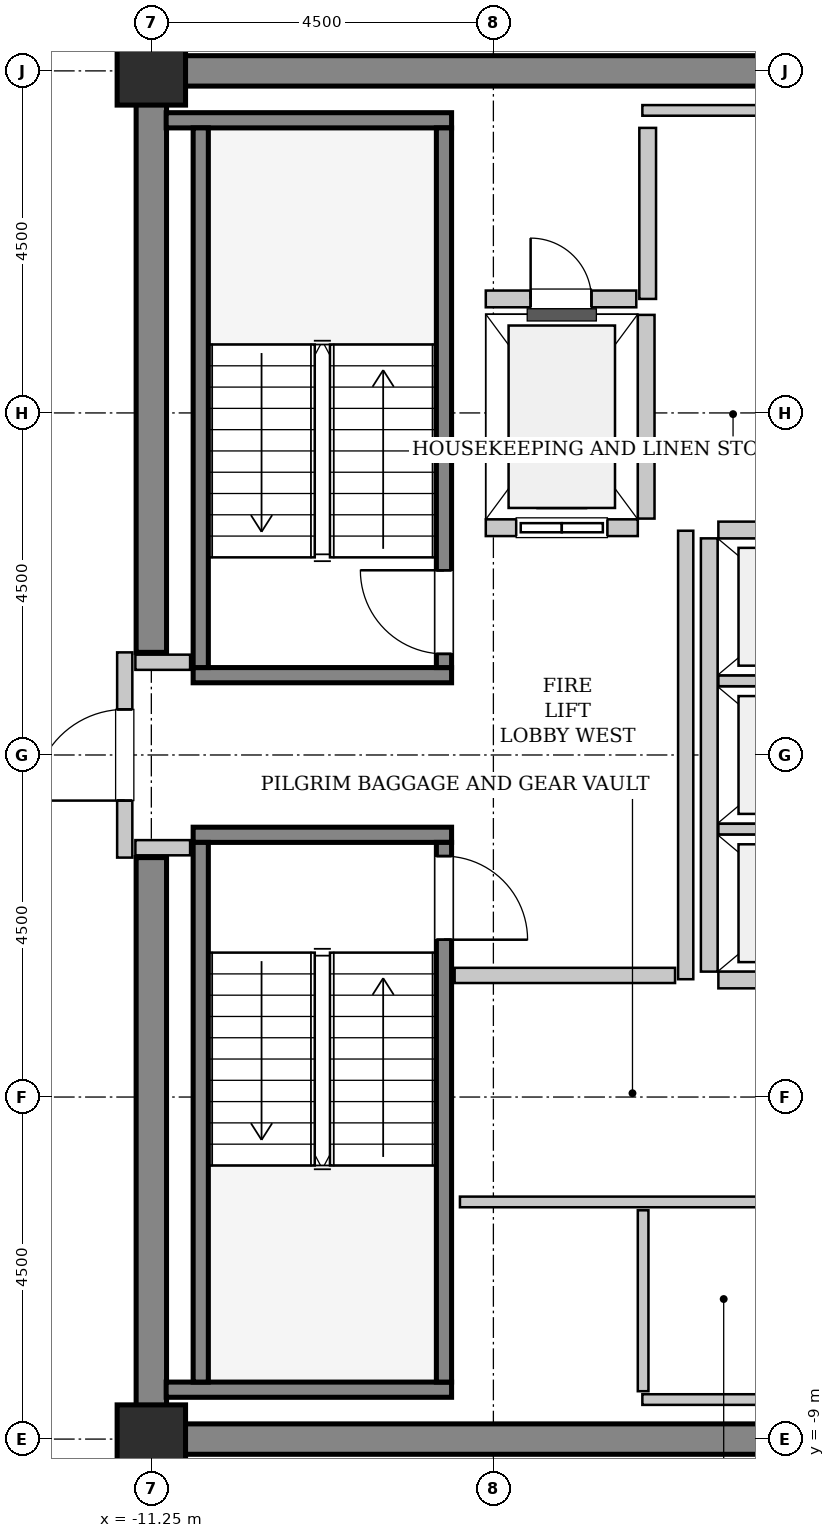
"""IFC4 building model, lengths in metres.
Left out: names, types, materials, properties, quantities, classifications, styles, units other than length and angle.
Written with IfcOpenShell. Run it as: python <this file> out.ifc"""

import sys

from ifc_helpers import new_model, si_unit, direction, frame, frame_2d, origin, origin_2d, place, context, subcontext, project, spatial, rectangle, extrude, source, transform, mapped, element, fill, save


model = new_model("IFC4")
c1 = context("Model", 3, precision=1e-05, world=origin(), true_north=direction((0.0, 1.0)))
c2 = subcontext(c1, "Body", "Model", "MODEL_VIEW")
j1 = project(units=[si_unit("LENGTHUNIT", "METRE"), si_unit("PLANEANGLEUNIT", "RADIAN")], contexts=[c1])
p1 = place(None, origin())
s1 = spatial("IfcSite", under=j1, at=p1, CompositionType="ELEMENT")
p2 = place(p1, origin())
s2 = spatial("IfcBuilding", under=s1, at=p2, CompositionType="ELEMENT")
p3 = place(p2, frame((0.0, 0.0, 326.2)))
s3 = spatial("IfcBuildingStorey", under=s2, at=p3, CompositionType="ELEMENT", Elevation=326.2)
m1 = source(origin(), c2, "Body", "SweptSolid", [
    extrude(rectangle(XDim=9.9, YDim=0.4, at=frame_2d((4.95, 0.0))), origin(), (0.0, 0.0, 1.0), 3.8),
])
for number, where, z_axis, x_axis in (
    (1, (-11.45, 9.0, 0.0), (0.0, 0.0, 1.0), (1.0, 0.0, 0.0)),
    (2, (-11.45, -9.0, 0.0), (0.0, 0.0, 1.0), (1.0, 0.0, 0.0)),
):
    element("IfcWall", number, at=place(p3, frame(where, z_axis=z_axis, x_axis=x_axis)), inside=s3, PredefinedType="SHEAR", context=c2, shape_type="MappedRepresentation", body=[
        mapped(m1, transform((0.0, 0.0, 0.0), x_axis=(1.0, 0.0, 0.0), y_axis=(0.0, 1.0, 0.0), z_axis=(0.0, 0.0, 1.0), scale=1.0)),
    ])
m2 = source(origin(), c2, "Body", "SweptSolid", [
    extrude(rectangle(XDim=7.45, YDim=0.4, at=frame_2d((3.725, 0.0))), origin(), (0.0, 0.0, 1.0), 3.8),
])
for number, where, z_axis, x_axis in (
    (3, (-11.25, -8.8, 0.0), (0.0, 0.0, 1.0), (0.0, 1.0, 0.0)),
    (4, (-11.25, 1.35, 0.0), (0.0, 0.0, 1.0), (0.0, 1.0, 0.0)),
):
    element("IfcWall", number, at=place(p3, frame(where, z_axis=z_axis, x_axis=x_axis)), inside=s3, PredefinedType="SHEAR", context=c2, shape_type="MappedRepresentation", body=[
        mapped(m2, transform((0.0, 0.0, 0.0), x_axis=(1.0, 0.0, 0.0), y_axis=(0.0, 1.0, 0.0), z_axis=(0.0, 0.0, 1.0), scale=1.0)),
    ])
m3 = source(origin(), c2, "Body", "SweptSolid", [
    extrude(rectangle(XDim=0.9, YDim=0.9, at=origin_2d()), origin(), (0.0, 0.0, 1.0), 3.8),
])
for number, where, z_axis, x_axis in (
    (5, (-11.25, -9.0, 0.0), (0.0, 0.0, 1.0), (1.0, 0.0, 0.0)),
    (6, (-11.25, 9.0, 0.0), (0.0, 0.0, 1.0), (1.0, 0.0, 0.0)),
):
    element("IfcColumn", number, at=place(p3, frame(where, z_axis=z_axis, x_axis=x_axis)), inside=s3, PredefinedType="COLUMN", context=c2, shape_type="MappedRepresentation", body=[
        mapped(m3, transform((0.0, 0.0, 0.0), x_axis=(1.0, 0.0, 0.0), y_axis=(0.0, 1.0, 0.0), z_axis=(0.0, 0.0, 1.0), scale=1.0)),
    ])
m4 = source(origin(), c2, "Body", "SweptSolid", [
    extrude(rectangle(XDim=3.4, YDim=0.2, at=frame_2d((1.7, 0.0))), origin(), (0.0, 0.0, 1.0), 3.8),
])
p4 = place(p3, frame((-7.3, 1.05, 0.0), z_axis=(0.0, 0.0, 1.0), x_axis=(-1.0, 0.0, 0.0)))
e7 = element("IfcWall", 7, at=p4, inside=s3, PredefinedType="SOLIDWALL", context=c2, shape_type="MappedRepresentation", body=[
    mapped(m4, transform((0.0, 0.0, 0.0), x_axis=(1.0, 0.0, 0.0), y_axis=(0.0, 1.0, 0.0), z_axis=(0.0, 0.0, 1.0), scale=1.0)),
])
m5 = source(origin(), c2, "Body", "SweptSolid", [
    extrude(rectangle(XDim=3.755, YDim=0.2, at=frame_2d((1.877, 0.0))), origin(), (0.0, 0.0, 1.0), 3.8),
])
p5 = place(p3, frame((-7.3, 8.35, 0.0), z_axis=(0.0, 0.0, 1.0), x_axis=(-1.0, 0.0, 0.0)))
e8 = element("IfcWall", 8, at=p5, inside=s3, PredefinedType="SOLIDWALL", context=c2, shape_type="MappedRepresentation", body=[
    mapped(m5, transform((0.0, 0.0, 0.0), x_axis=(1.0, 0.0, 0.0), y_axis=(0.0, 1.0, 0.0), z_axis=(0.0, 0.0, 1.0), scale=1.0)),
])
m6 = source(origin(), c2, "Body", "SweptSolid", [
    extrude(rectangle(XDim=7.1, YDim=0.2, at=frame_2d((3.55, 0.0))), origin(), (0.0, 0.0, 1.0), 3.8),
])
p6 = place(p3, frame((-7.4, 1.15, 0.0), z_axis=(0.0, 0.0, 1.0), x_axis=(0.0, 1.0, 0.0)))
e9 = element("IfcWall", 9, at=p6, inside=s3, PredefinedType="SOLIDWALL", context=c2, shape_type="MappedRepresentation", body=[
    mapped(m6, transform((0.0, 0.0, 0.0), x_axis=(1.0, 0.0, 0.0), y_axis=(0.0, 1.0, 0.0), z_axis=(0.0, 0.0, 1.0), scale=1.0)),
])
p7 = place(p6, frame((0.18, 0.0, 0.0)))
e10 = element("IfcOpeningElement", 10, at=p7, cuts=e9, PredefinedType="OPENING", context=c2, shape_type="SweptSolid", body=[
    extrude(rectangle(XDim=1.1, YDim=2.15, at=frame_2d((0.55, 1.075))), frame((0.0, 0.11, 0.0), z_axis=(0.0, -1.0, 0.0), x_axis=(1.0, 0.0, 0.0)), (0.0, 0.0, 1.0), 0.22),
])
p8 = place(p3, frame((-10.6, 1.15, 0.0), z_axis=(0.0, 0.0, 1.0), x_axis=(0.0, 1.0, 0.0)))
e11 = element("IfcWall", 11, at=p8, inside=s3, PredefinedType="SOLIDWALL", context=c2, shape_type="MappedRepresentation", body=[
    mapped(m6, transform((0.0, 0.0, 0.0), x_axis=(1.0, 0.0, 0.0), y_axis=(0.0, 1.0, 0.0), z_axis=(0.0, 0.0, 1.0), scale=1.0)),
])
p9 = place(p3, frame((-10.7, -1.05, 0.0), z_axis=(0.0, 0.0, 1.0), x_axis=(1.0, 0.0, 0.0)))
e12 = element("IfcWall", 12, at=p9, inside=s3, PredefinedType="SOLIDWALL", context=c2, shape_type="MappedRepresentation", body=[
    mapped(m4, transform((0.0, 0.0, 0.0), x_axis=(1.0, 0.0, 0.0), y_axis=(0.0, 1.0, 0.0), z_axis=(0.0, 0.0, 1.0), scale=1.0)),
])
p10 = place(p3, frame((-11.055, -8.35, 0.0), z_axis=(0.0, 0.0, 1.0), x_axis=(1.0, 0.0, 0.0)))
e13 = element("IfcWall", 13, at=p10, inside=s3, PredefinedType="SOLIDWALL", context=c2, shape_type="MappedRepresentation", body=[
    mapped(m5, transform((0.0, 0.0, 0.0), x_axis=(1.0, 0.0, 0.0), y_axis=(0.0, 1.0, 0.0), z_axis=(0.0, 0.0, 1.0), scale=1.0)),
])
p11 = place(p3, frame((-10.6, -1.15, 0.0), z_axis=(0.0, 0.0, 1.0), x_axis=(0.0, -1.0, 0.0)))
e14 = element("IfcWall", 14, at=p11, inside=s3, PredefinedType="SOLIDWALL", context=c2, shape_type="MappedRepresentation", body=[
    mapped(m6, transform((0.0, 0.0, 0.0), x_axis=(1.0, 0.0, 0.0), y_axis=(0.0, 1.0, 0.0), z_axis=(0.0, 0.0, 1.0), scale=1.0)),
])
p12 = place(p3, frame((-7.4, -1.15, 0.0), z_axis=(0.0, 0.0, 1.0), x_axis=(0.0, -1.0, 0.0)))
e15 = element("IfcWall", 15, at=p12, inside=s3, PredefinedType="SOLIDWALL", context=c2, shape_type="MappedRepresentation", body=[
    mapped(m6, transform((0.0, 0.0, 0.0), x_axis=(1.0, 0.0, 0.0), y_axis=(0.0, 1.0, 0.0), z_axis=(0.0, 0.0, 1.0), scale=1.0)),
])
p13 = place(p12, frame((0.18, 0.0, 0.0)))
e16 = element("IfcOpeningElement", 16, at=p13, cuts=e15, PredefinedType="OPENING", context=c2, shape_type="SweptSolid", body=[
    extrude(rectangle(XDim=1.1, YDim=2.15, at=frame_2d((0.55, 1.075))), frame((0.0, 0.11, 0.0), z_axis=(0.0, -1.0, 0.0), x_axis=(1.0, 0.0, 0.0)), (0.0, 0.0, 1.0), 0.22),
])
m7 = source(origin(), c2, "Body", "SweptSolid", [
    extrude(rectangle(XDim=2.0, YDim=0.22, at=frame_2d((1.0, 0.0))), origin(), (0.0, 0.0, 1.0), 3.535),
])
p14 = place(p3, frame((-6.85, 2.99, 0.0), z_axis=(0.0, 0.0, 1.0), x_axis=(1.0, 0.0, 0.0)))
e17 = element("IfcWall", 17, at=p14, inside=s3, PredefinedType="SOLIDWALL", context=c2, shape_type="MappedRepresentation", body=[
    mapped(m7, transform((0.0, 0.0, 0.0), x_axis=(1.0, 0.0, 0.0), y_axis=(0.0, 1.0, 0.0), z_axis=(0.0, 0.0, 1.0), scale=1.0)),
])
p15 = place(p14, frame((0.4, 0.0, 0.0)))
e18 = element("IfcOpeningElement", 18, at=p15, cuts=e17, PredefinedType="OPENING", context=c2, shape_type="SweptSolid", body=[
    extrude(rectangle(XDim=1.2, YDim=2.2, at=frame_2d((0.6, 1.1))), frame((0.0, 0.12, 0.0), z_axis=(0.0, -1.0, 0.0), x_axis=(1.0, 0.0, 0.0)), (0.0, 0.0, 1.0), 0.24),
])
m8 = source(origin(), c2, "Body", "SweptSolid", [
    extrude(rectangle(XDim=2.68, YDim=0.22, at=frame_2d((1.34, 0.0))), origin(), (0.0, 0.0, 1.0), 3.535),
])
p16 = place(p3, frame((-4.74, 3.11, 0.0), z_axis=(0.0, 0.0, 1.0), x_axis=(0.0, 1.0, 0.0)))
e19 = element("IfcWall", 19, at=p16, inside=s3, PredefinedType="SOLIDWALL", context=c2, shape_type="MappedRepresentation", body=[
    mapped(m8, transform((0.0, 0.0, 0.0), x_axis=(1.0, 0.0, 0.0), y_axis=(0.0, 1.0, 0.0), z_axis=(0.0, 0.0, 1.0), scale=1.0)),
])
m9 = source(origin(), c2, "Body", "SweptSolid", [
    extrude(rectangle(XDim=5.7, YDim=0.22, at=frame_2d((2.85, 0.0))), origin(), (0.0, 0.0, 1.0), 3.535),
])
p17 = place(p3, frame((-3.91, 2.85, 0.0), z_axis=(0.0, 0.0, 1.0), x_axis=(0.0, -1.0, 0.0)))
e20 = element("IfcWall", 20, at=p17, inside=s3, PredefinedType="SOLIDWALL", context=c2, shape_type="MappedRepresentation", body=[
    mapped(m9, transform((0.0, 0.0, 0.0), x_axis=(1.0, 0.0, 0.0), y_axis=(0.0, 1.0, 0.0), z_axis=(0.0, 0.0, 1.0), scale=1.0)),
])
m10 = source(origin(), c2, "Body", "SweptSolid", [
    extrude(rectangle(XDim=2.13, YDim=0.22, at=frame_2d((1.065, 0.0))), origin(), (0.0, 0.0, 1.0), 3.535),
])
p18 = place(p3, frame((-3.79, -2.96, 0.0), z_axis=(0.0, 0.0, 1.0), x_axis=(1.0, 0.0, 0.0)))
e21 = element("IfcWall", 21, at=p18, inside=s3, PredefinedType="SOLIDWALL", context=c2, shape_type="MappedRepresentation", body=[
    mapped(m10, transform((0.0, 0.0, 0.0), x_axis=(1.0, 0.0, 0.0), y_axis=(0.0, 1.0, 0.0), z_axis=(0.0, 0.0, 1.0), scale=1.0)),
])
m11 = source(origin(), c2, "Body", "SweptSolid", [
    extrude(rectangle(XDim=2.13, YDim=0.14, at=frame_2d((1.065, 0.0))), origin(), (0.0, 0.0, 1.0), 3.535),
])
for number, where, z_axis, x_axis in (
    (22, (-3.79, -0.975, 0.0), (0.0, 0.0, 1.0), (1.0, 0.0, 0.0)),
    (23, (-3.79, 0.975, 0.0), (0.0, 0.0, 1.0), (1.0, 0.0, 0.0)),
):
    element("IfcWall", number, at=place(p3, frame(where, z_axis=z_axis, x_axis=x_axis)), inside=s3, PredefinedType="PARTITIONING", context=c2, shape_type="MappedRepresentation", body=[
        mapped(m11, transform((0.0, 0.0, 0.0), x_axis=(1.0, 0.0, 0.0), y_axis=(0.0, 1.0, 0.0), z_axis=(0.0, 0.0, 1.0), scale=1.0)),
    ])
p19 = place(p3, frame((-1.66, 2.96, 0.0), z_axis=(0.0, 0.0, 1.0), x_axis=(-1.0, 0.0, 0.0)))
e24 = element("IfcWall", 24, at=p19, inside=s3, PredefinedType="SOLIDWALL", context=c2, shape_type="MappedRepresentation", body=[
    mapped(m10, transform((0.0, 0.0, 0.0), x_axis=(1.0, 0.0, 0.0), y_axis=(0.0, 1.0, 0.0), z_axis=(0.0, 0.0, 1.0), scale=1.0)),
])
m12 = source(origin(), c2, "Body", "SweptSolid", [
    extrude(rectangle(XDim=2.25, YDim=0.22, at=frame_2d((1.125, 0.0))), origin(), (0.0, 0.0, 1.0), 3.535),
])
p20 = place(p3, frame((-4.72, 6.0, 0.0), z_axis=(0.0, 0.0, 1.0), x_axis=(0.0, 1.0, 0.0)))
e25 = element("IfcWall", 25, at=p20, inside=s3, PredefinedType="SOLIDWALL", context=c2, shape_type="MappedRepresentation", body=[
    mapped(m12, transform((0.0, 0.0, 0.0), x_axis=(1.0, 0.0, 0.0), y_axis=(0.0, 1.0, 0.0), z_axis=(0.0, 0.0, 1.0), scale=1.0)),
])
m13 = source(origin(), c2, "Body", "SweptSolid", [
    extrude(rectangle(XDim=1.98, YDim=0.22, at=frame_2d((0.99, 0.0))), origin(), (0.0, 0.0, 1.0), 3.535),
])
p21 = place(p3, frame((-6.85, 6.0, 0.0), z_axis=(0.0, 0.0, 1.0), x_axis=(1.0, 0.0, 0.0)))
e26 = element("IfcWall", 26, at=p21, inside=s3, PredefinedType="SOLIDWALL", context=c2, shape_type="MappedRepresentation", body=[
    mapped(m13, transform((0.0, 0.0, 0.0), x_axis=(1.0, 0.0, 0.0), y_axis=(0.0, 1.0, 0.0), z_axis=(0.0, 0.0, 1.0), scale=1.0)),
])
p22 = place(p21, frame((0.59, 0.0, 0.0)))
e27 = element("IfcOpeningElement", 27, at=p22, cuts=e26, PredefinedType="OPENING", context=c2, shape_type="SweptSolid", body=[
    extrude(rectangle(XDim=0.8, YDim=2.0, at=frame_2d((0.4, 1.0))), frame((0.0, 0.12, 0.0), z_axis=(0.0, -1.0, 0.0), x_axis=(1.0, 0.0, 0.0)), (0.0, 0.0, 1.0), 0.24),
])
m14 = source(origin(), c2, "Body", "SweptSolid", [
    extrude(rectangle(XDim=2.7, YDim=0.2, at=frame_2d((1.35, 0.0))), origin(), (0.0, 0.0, 1.0), 2.625),
])
p23 = place(p3, frame((-11.6, -1.35, 0.0), z_axis=(0.0, 0.0, 1.0), x_axis=(0.0, 1.0, 0.0)))
e28 = element("IfcWall", 28, at=p23, inside=s3, PredefinedType="PARTITIONING", context=c2, shape_type="MappedRepresentation", body=[
    mapped(m14, transform((0.0, 0.0, 0.0), x_axis=(1.0, 0.0, 0.0), y_axis=(0.0, 1.0, 0.0), z_axis=(0.0, 0.0, 1.0), scale=1.0)),
])
p24 = place(p23, frame((0.75, 0.0, 0.0)))
e29 = element("IfcOpeningElement", 29, at=p24, cuts=e28, PredefinedType="OPENING", context=c2, shape_type="SweptSolid", body=[
    extrude(rectangle(XDim=1.2, YDim=2.15, at=frame_2d((0.6, 1.075))), frame((0.0, 0.11, 0.0), z_axis=(0.0, -1.0, 0.0), x_axis=(1.0, 0.0, 0.0)), (0.0, 0.0, 1.0), 0.22),
])
m15 = source(origin(), c2, "Body", "SweptSolid", [
    extrude(rectangle(XDim=5.9, YDim=0.2, at=frame_2d((2.95, 0.0))), origin(), (0.0, 0.0, 1.0), 3.535),
])
p25 = place(p3, frame((-4.22, -2.95, 0.0), z_axis=(0.0, 0.0, 1.0), x_axis=(0.0, 1.0, 0.0)))
e30 = element("IfcWall", 30, at=p25, inside=s3, PredefinedType="PARTITIONING", context=c2, shape_type="MappedRepresentation", body=[
    mapped(m15, transform((0.0, 0.0, 0.0), x_axis=(1.0, 0.0, 0.0), y_axis=(0.0, 1.0, 0.0), z_axis=(0.0, 0.0, 1.0), scale=1.0)),
])
m16 = source(origin(), c2, "Body", "SweptSolid", [
    extrude(rectangle(XDim=2.9, YDim=0.2, at=frame_2d((1.45, 0.0))), origin(), (0.0, 0.0, 1.0), 3.535),
])
p26 = place(p3, frame((-7.26, -2.9, 0.0), z_axis=(0.0, 0.0, 1.0), x_axis=(1.0, 0.0, 0.0)))
e31 = element("IfcWall", 31, at=p26, inside=s3, PredefinedType="PARTITIONING", context=c2, shape_type="MappedRepresentation", body=[
    mapped(m16, transform((0.0, 0.0, 0.0), x_axis=(1.0, 0.0, 0.0), y_axis=(0.0, 1.0, 0.0), z_axis=(0.0, 0.0, 1.0), scale=1.0)),
])
m17 = source(origin(), c2, "Body", "SweptSolid", [
    extrude(rectangle(XDim=0.72, YDim=0.2, at=frame_2d((0.36, 0.0))), origin(), (0.0, 0.0, 1.0), 3.535),
])
for number, where, z_axis, x_axis in (
    (32, (-11.46, 1.22, 0.0), (0.0, 0.0, 1.0), (1.0, 0.0, 0.0)),
    (33, (-11.46, -1.22, 0.0), (0.0, 0.0, 1.0), (1.0, 0.0, 0.0)),
):
    element("IfcWall", number, at=place(p3, frame(where, z_axis=z_axis, x_axis=x_axis)), inside=s3, PredefinedType="PARTITIONING", context=c2, shape_type="MappedRepresentation", body=[
        mapped(m17, transform((0.0, 0.0, 0.0), x_axis=(1.0, 0.0, 0.0), y_axis=(0.0, 1.0, 0.0), z_axis=(0.0, 0.0, 1.0), scale=1.0)),
    ])
m18 = source(origin(), c2, "Body", "SweptSolid", [
    extrude(rectangle(XDim=3.15, YDim=0.14, at=frame_2d((1.575, 0.0))), origin(), (0.0, 0.0, 1.0), 3.535),
])
p27 = place(p3, frame((-4.79, 8.48, 0.0), z_axis=(0.0, 0.0, 1.0), x_axis=(1.0, 0.0, 0.0)))
e34 = element("IfcWall", 34, at=p27, inside=s3, PredefinedType="PARTITIONING", context=c2, shape_type="MappedRepresentation", body=[
    mapped(m18, transform((0.0, 0.0, 0.0), x_axis=(1.0, 0.0, 0.0), y_axis=(0.0, 1.0, 0.0), z_axis=(0.0, 0.0, 1.0), scale=1.0)),
])
m19 = source(origin(), c2, "Body", "SweptSolid", [
    extrude(rectangle(XDim=5.55, YDim=0.14, at=frame_2d((2.775, 0.0))), origin(), (0.0, 0.0, 1.0), 3.535),
])
p28 = place(p3, frame((-7.19, -5.88, 0.0), z_axis=(0.0, 0.0, 1.0), x_axis=(1.0, 0.0, 0.0)))
e35 = element("IfcWall", 35, at=p28, inside=s3, PredefinedType="PARTITIONING", context=c2, shape_type="MappedRepresentation", body=[
    mapped(m19, transform((0.0, 0.0, 0.0), x_axis=(1.0, 0.0, 0.0), y_axis=(0.0, 1.0, 0.0), z_axis=(0.0, 0.0, 1.0), scale=1.0)),
])
p29 = place(p3, frame((-4.79, -8.48, 0.0), z_axis=(0.0, 0.0, 1.0), x_axis=(1.0, 0.0, 0.0)))
e36 = element("IfcWall", 36, at=p29, inside=s3, PredefinedType="PARTITIONING", context=c2, shape_type="MappedRepresentation", body=[
    mapped(m18, transform((0.0, 0.0, 0.0), x_axis=(1.0, 0.0, 0.0), y_axis=(0.0, 1.0, 0.0), z_axis=(0.0, 0.0, 1.0), scale=1.0)),
])
m20 = source(origin(), c2, "Body", "SweptSolid", [
    extrude(rectangle(XDim=2.38, YDim=0.14, at=frame_2d((1.19, 0.0))), origin(), (0.0, 0.0, 1.0), 3.535),
])
p30 = place(p3, frame((-4.78, -8.37, 0.0), z_axis=(0.0, 0.0, 1.0), x_axis=(0.0, 1.0, 0.0)))
e37 = element("IfcWall", 37, at=p30, inside=s3, PredefinedType="PARTITIONING", context=c2, shape_type="MappedRepresentation", body=[
    mapped(m20, transform((0.0, 0.0, 0.0), x_axis=(1.0, 0.0, 0.0), y_axis=(0.0, 1.0, 0.0), z_axis=(0.0, 0.0, 1.0), scale=1.0)),
])
m21 = source(origin(), c2, "Body", "SweptSolid", [
    extrude(rectangle(XDim=1.1, YDim=2.15, at=frame_2d((0.55, 1.075))), frame((0.0, 0.025, 0.0), z_axis=(0.0, -1.0, 0.0), x_axis=(1.0, 0.0, 0.0)), (0.0, 0.0, 1.0), 0.05),
])
p31 = place(p7, origin())
e38 = element("IfcDoor", 38, at=p31, inside=s3, OperationType="SINGLE_SWING_RIGHT", PredefinedType="DOOR", context=c2, shape_type="MappedRepresentation", body=[
    mapped(m21, transform((0.0, 0.0, 0.0), x_axis=(1.0, 0.0, 0.0), y_axis=(0.0, 1.0, 0.0), z_axis=(0.0, 0.0, 1.0), scale=1.0)),
])
fill(e10, e38)
p32 = place(p13, origin())
e39 = element("IfcDoor", 39, at=p32, inside=s3, OperationType="SINGLE_SWING_RIGHT", PredefinedType="DOOR", context=c2, shape_type="MappedRepresentation", body=[
    mapped(m21, transform((0.0, 0.0, 0.0), x_axis=(1.0, 0.0, 0.0), y_axis=(0.0, 1.0, 0.0), z_axis=(0.0, 0.0, 1.0), scale=1.0)),
])
fill(e16, e39)
m22 = source(origin(), c2, "Body", "SweptSolid", [
    extrude(rectangle(XDim=1.2, YDim=2.2, at=frame_2d((0.6, 1.1))), frame((0.0, 0.025, 0.0), z_axis=(0.0, -1.0, 0.0), x_axis=(1.0, 0.0, 0.0)), (0.0, 0.0, 1.0), 0.05),
])
p33 = place(p15, origin())
e40 = element("IfcDoor", 40, at=p33, inside=s3, OperationType="SLIDING_TO_LEFT", PredefinedType="DOOR", context=c2, shape_type="MappedRepresentation", body=[
    mapped(m22, transform((0.0, 0.0, 0.0), x_axis=(1.0, 0.0, 0.0), y_axis=(0.0, 1.0, 0.0), z_axis=(0.0, 0.0, 1.0), scale=1.0)),
])
fill(e18, e40)
m23 = source(origin(), c2, "Body", "SweptSolid", [
    extrude(rectangle(XDim=0.8, YDim=2.0, at=frame_2d((0.4, 1.0))), frame((0.0, 0.025, 0.0), z_axis=(0.0, -1.0, 0.0), x_axis=(1.0, 0.0, 0.0)), (0.0, 0.0, 1.0), 0.05),
])
p34 = place(p22, origin())
e41 = element("IfcDoor", 41, at=p34, inside=s3, OperationType="SINGLE_SWING_LEFT", PredefinedType="TRAPDOOR", context=c2, shape_type="MappedRepresentation", body=[
    mapped(m23, transform((0.0, 0.0, 0.0), x_axis=(1.0, 0.0, 0.0), y_axis=(0.0, 1.0, 0.0), z_axis=(0.0, 0.0, 1.0), scale=1.0)),
])
fill(e27, e41)
m24 = source(origin(), c2, "Body", "SweptSolid", [
    extrude(rectangle(XDim=1.2, YDim=2.15, at=frame_2d((0.6, 1.075))), frame((0.0, 0.025, 0.0), z_axis=(0.0, -1.0, 0.0), x_axis=(1.0, 0.0, 0.0)), (0.0, 0.0, 1.0), 0.05),
])
p35 = place(p24, origin())
e42 = element("IfcDoor", 42, at=p35, inside=s3, OperationType="SINGLE_SWING_LEFT", PredefinedType="DOOR", context=c2, shape_type="MappedRepresentation", body=[
    mapped(m24, transform((0.0, 0.0, 0.0), x_axis=(1.0, 0.0, 0.0), y_axis=(0.0, 1.0, 0.0), z_axis=(0.0, 0.0, 1.0), scale=1.0)),
])
fill(e29, e42)
save(model, sys.argv[1])
